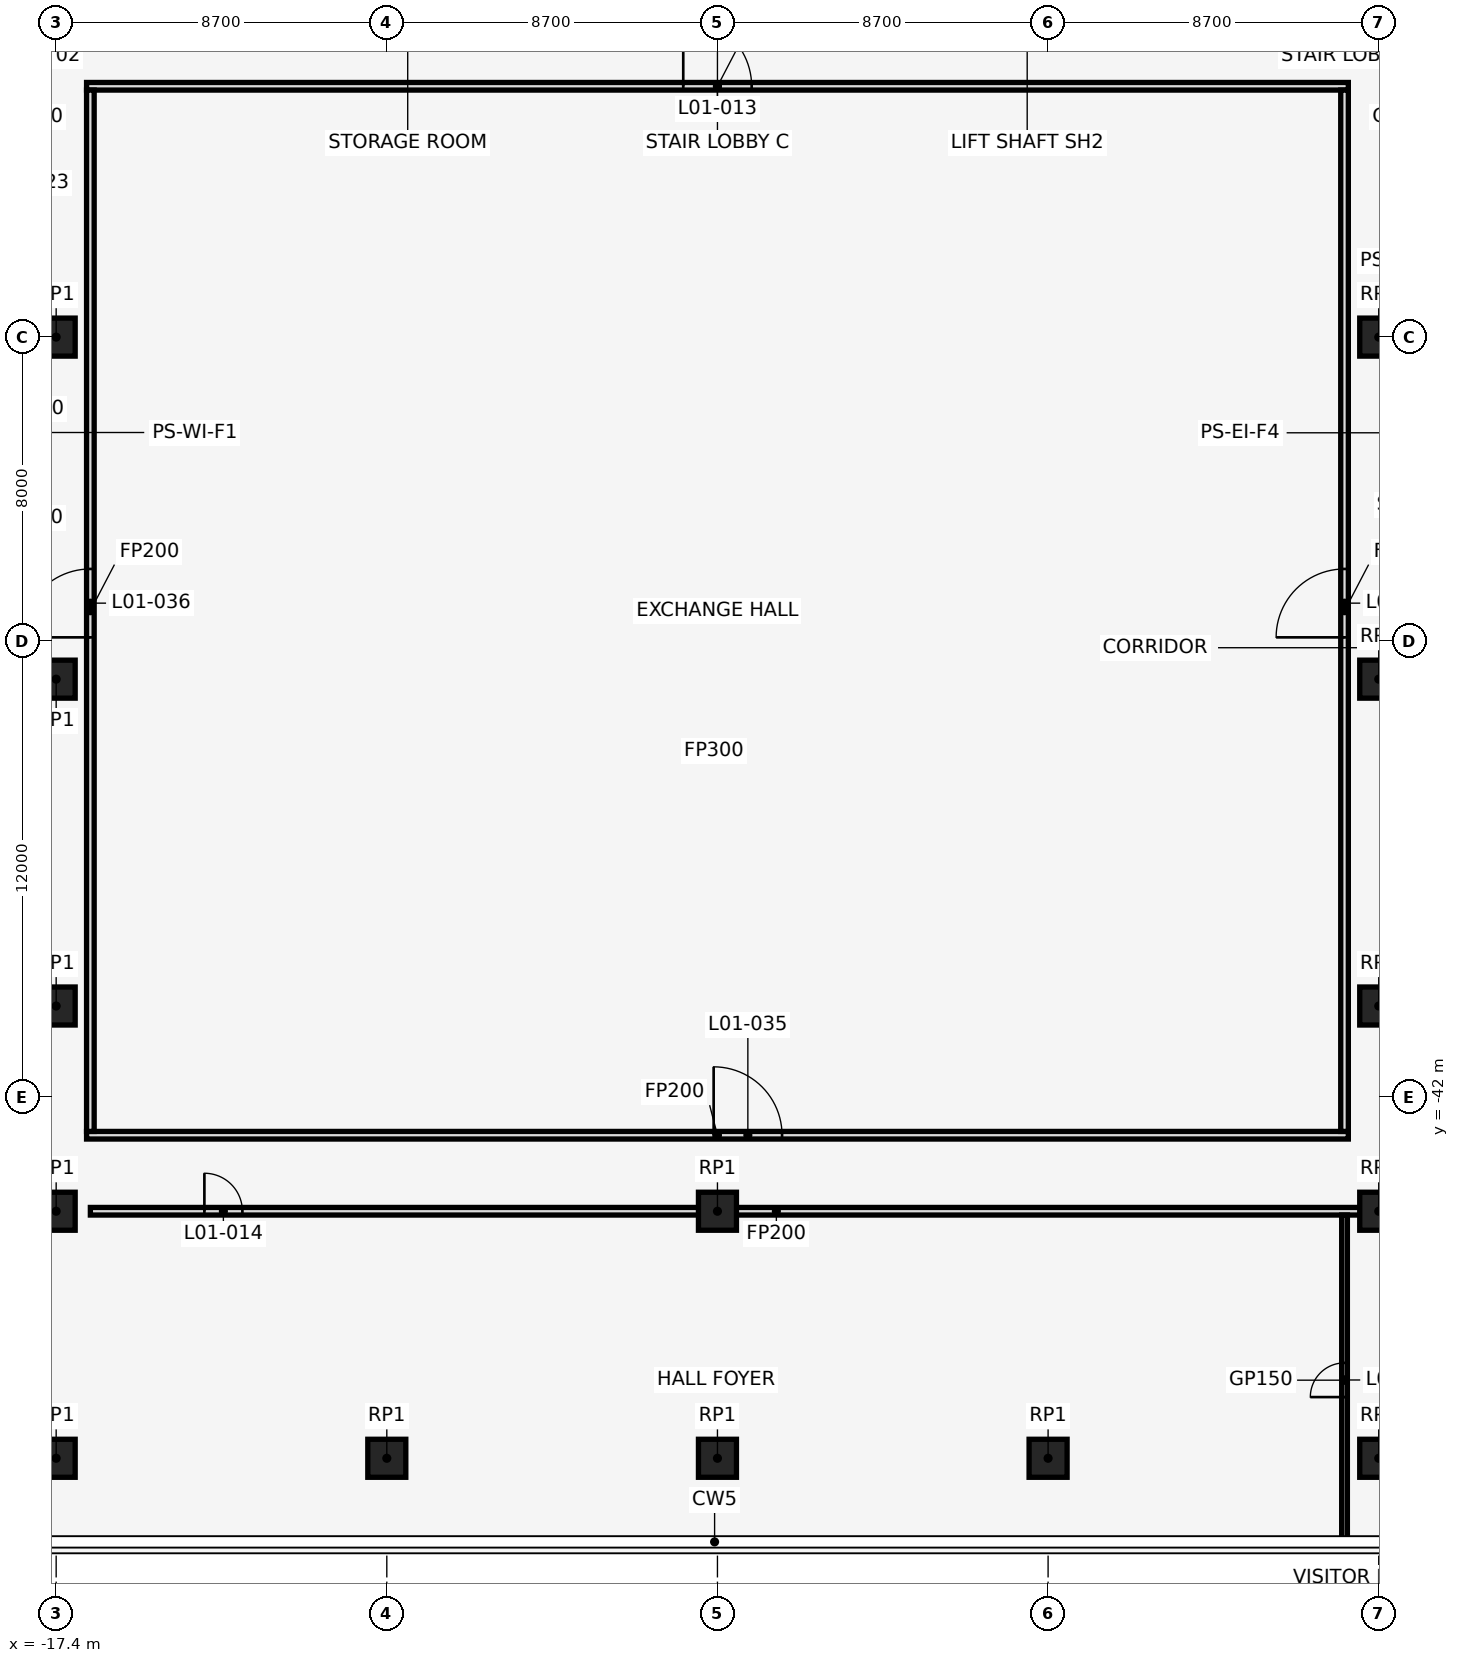
"""IFC4 building model, lengths in metres.
Left out: names, types, materials, properties, quantities, classifications, styles, units other than length and angle.
Written with IfcOpenShell. Run it as: python <this file> out.ifc"""

import sys

from ifc_helpers import new_model, si_unit, direction, frame, frame_2d, origin, origin_2d, place, context, subcontext, project, spatial, rectangle, extrude, element, fill, save


model = new_model("IFC4")
c1 = context("Model", 3, precision=1e-05, world=origin(), true_north=direction((0.0, 1.0)))
c2 = subcontext(c1, "Body", "Model", "MODEL_VIEW")
j1 = project(units=[si_unit("LENGTHUNIT", "METRE"), si_unit("PLANEANGLEUNIT", "RADIAN")], contexts=[c1])
p1 = place(None, origin())
s1 = spatial("IfcSite", under=j1, at=p1, CompositionType="ELEMENT")
p2 = place(p1, origin())
s2 = spatial("IfcBuilding", under=s1, at=p2, CompositionType="ELEMENT")
p3 = place(p2, frame((0.0, 0.0, 8.0)))
s3 = spatial("IfcBuildingStorey", under=s2, at=p3, CompositionType="ELEMENT", Elevation=8.0)
for number, where, z_axis, x_axis in (
    (1, (-17.4, -39.6, 0.0), (0.0, 0.0, 1.0), (1.0, 0.0, 0.0)),
    (2, (17.4, -39.6, 0.0), (0.0, 0.0, 1.0), (1.0, 0.0, 0.0)),
    (3, (-17.4, -22.0, 0.0), (0.0, 0.0, 1.0), (1.0, 0.0, 0.0)),
    (4, (17.4, -22.0, 0.0), (0.0, 0.0, 1.0), (1.0, 0.0, 0.0)),
    (5, (-17.4, -31.0, 0.0), (0.0, 0.0, 1.0), (1.0, 0.0, 0.0)),
    (6, (-17.4, -45.0, 0.0), (0.0, 0.0, 1.0), (1.0, 0.0, 0.0)),
    (7, (-17.4, -51.5, 0.0), (0.0, 0.0, 1.0), (1.0, 0.0, 0.0)),
    (8, (-8.7, -51.5, 0.0), (0.0, 0.0, 1.0), (1.0, 0.0, 0.0)),
    (9, (0.0, -45.0, 0.0), (0.0, 0.0, 1.0), (1.0, 0.0, 0.0)),
    (10, (0.0, -51.5, 0.0), (0.0, 0.0, 1.0), (1.0, 0.0, 0.0)),
    (11, (8.7, -51.5, 0.0), (0.0, 0.0, 1.0), (1.0, 0.0, 0.0)),
    (12, (17.4, -31.0, 0.0), (0.0, 0.0, 1.0), (1.0, 0.0, 0.0)),
    (13, (17.4, -45.0, 0.0), (0.0, 0.0, 1.0), (1.0, 0.0, 0.0)),
    (14, (17.4, -51.5, 0.0), (0.0, 0.0, 1.0), (1.0, 0.0, 0.0)),
):
    element("IfcColumn", number, at=place(p3, frame(where, z_axis=z_axis, x_axis=x_axis)), inside=s3, PredefinedType="COLUMN", context=c2, shape_type="SweptSolid", body=[
        extrude(rectangle(XDim=1.0, YDim=1.0, at=origin_2d()), origin(), (0.0, 0.0, 1.0), 6.0),
    ])
p4 = place(p3, frame((-16.5, -45.0, 0.0), z_axis=(0.0, 0.0, 1.0), x_axis=(1.0, 0.0, 0.0)))
e15 = element("IfcWall", 15, at=p4, inside=s3, PredefinedType="PARTITIONING", context=c2, shape_type="SweptSolid", body=[
    extrude(rectangle(XDim=36.1, YDim=0.2, at=frame_2d((18.05, 0.0))), origin(), (0.0, 0.0, 1.0), 5.7),
])
p5 = place(p4, frame((3.0, 0.0, 0.0)))
e16 = element("IfcOpeningElement", 16, at=p5, cuts=e15, PredefinedType="OPENING", context=c2, shape_type="SweptSolid", body=[
    extrude(rectangle(XDim=1.0, YDim=2.1, at=frame_2d((0.5, 1.05))), frame((0.0, 0.112, 0.0), z_axis=(0.0, -1.0, 0.0), x_axis=(1.0, 0.0, 0.0)), (0.0, 0.0, 1.0), 0.224),
])
p6 = place(p3, frame((-16.6, -43.0, 0.0), z_axis=(0.0, 0.0, 1.0), x_axis=(1.0, 0.0, 0.0)))
e17 = element("IfcWall", 17, at=p6, inside=s3, PredefinedType="PARTITIONING", context=c2, shape_type="SweptSolid", body=[
    extrude(rectangle(XDim=33.2, YDim=0.2, at=frame_2d((16.6, 0.0))), origin(), (0.0, 0.0, 1.0), 5.7),
])
p7 = place(p6, frame((16.5, 0.0, 0.0)))
e18 = element("IfcOpeningElement", 18, at=p7, cuts=e17, PredefinedType="OPENING", context=c2, shape_type="SweptSolid", body=[
    extrude(rectangle(XDim=1.8, YDim=2.1, at=frame_2d((0.9, 1.05))), frame((0.0, 0.112, 0.0), z_axis=(0.0, -1.0, 0.0), x_axis=(1.0, 0.0, 0.0)), (0.0, 0.0, 1.0), 0.224),
])
p8 = place(p3, frame((-16.6, -15.4, 0.0), z_axis=(0.0, 0.0, 1.0), x_axis=(1.0, 0.0, 0.0)))
e19 = element("IfcWall", 19, at=p8, inside=s3, PredefinedType="PARTITIONING", context=c2, shape_type="SweptSolid", body=[
    extrude(rectangle(XDim=33.2, YDim=0.2, at=frame_2d((16.6, 0.0))), origin(), (0.0, 0.0, 1.0), 5.7),
])
p9 = place(p8, frame((15.7, 0.0, 0.0)))
e20 = element("IfcOpeningElement", 20, at=p9, cuts=e19, PredefinedType="OPENING", context=c2, shape_type="SweptSolid", body=[
    extrude(rectangle(XDim=1.8, YDim=2.1, at=frame_2d((0.9, 1.05))), frame((0.0, 0.112, 0.0), z_axis=(0.0, -1.0, 0.0), x_axis=(1.0, 0.0, 0.0)), (0.0, 0.0, 1.0), 0.224),
])
p10 = place(p3, frame((-16.5, -42.9, 0.0), z_axis=(0.0, 0.0, 1.0), x_axis=(0.0, 1.0, 0.0)))
e21 = element("IfcWall", 21, at=p10, inside=s3, PredefinedType="PARTITIONING", context=c2, shape_type="SweptSolid", body=[
    extrude(rectangle(XDim=27.4, YDim=0.2, at=frame_2d((13.7, 0.0))), origin(), (0.0, 0.0, 1.0), 5.7),
])
p11 = place(p10, frame((13.0, 0.0, 0.0)))
e22 = element("IfcOpeningElement", 22, at=p11, cuts=e21, PredefinedType="OPENING", context=c2, shape_type="SweptSolid", body=[
    extrude(rectangle(XDim=1.8, YDim=2.1, at=frame_2d((0.9, 1.05))), frame((0.0, 0.112, 0.0), z_axis=(0.0, -1.0, 0.0), x_axis=(1.0, 0.0, 0.0)), (0.0, 0.0, 1.0), 0.224),
])
p12 = place(p3, frame((16.5, -53.79, 0.0), z_axis=(0.0, 0.0, 1.0), x_axis=(0.0, 1.0, 0.0)))
e23 = element("IfcWall", 23, at=p12, inside=s3, PredefinedType="PARTITIONING", context=c2, shape_type="SweptSolid", body=[
    extrude(rectangle(XDim=8.69, YDim=0.15, at=frame_2d((4.345, 0.0))), origin(), (0.0, 0.0, 1.0), 5.7),
])
p13 = place(p12, frame((3.9, 0.0, 0.0)))
e24 = element("IfcOpeningElement", 24, at=p13, cuts=e23, PredefinedType="OPENING", context=c2, shape_type="SweptSolid", body=[
    extrude(rectangle(XDim=0.9, YDim=2.1, at=frame_2d((0.45, 1.05))), frame((0.0, 0.087, 0.0), z_axis=(0.0, -1.0, 0.0), x_axis=(1.0, 0.0, 0.0)), (0.0, 0.0, 1.0), 0.174),
])
p14 = place(p3, frame((16.5, -42.9, 0.0), z_axis=(0.0, 0.0, 1.0), x_axis=(0.0, 1.0, 0.0)))
e25 = element("IfcWall", 25, at=p14, inside=s3, PredefinedType="PARTITIONING", context=c2, shape_type="SweptSolid", body=[
    extrude(rectangle(XDim=27.4, YDim=0.2, at=frame_2d((13.7, 0.0))), origin(), (0.0, 0.0, 1.0), 5.7),
])
p15 = place(p14, frame((13.0, 0.0, 0.0)))
e26 = element("IfcOpeningElement", 26, at=p15, cuts=e25, PredefinedType="OPENING", context=c2, shape_type="SweptSolid", body=[
    extrude(rectangle(XDim=1.8, YDim=2.1, at=frame_2d((0.9, 1.05))), frame((0.0, 0.112, 0.0), z_axis=(0.0, -1.0, 0.0), x_axis=(1.0, 0.0, 0.0)), (0.0, 0.0, 1.0), 0.224),
])
p16 = place(p9, origin())
e27 = element("IfcDoor", 27, at=p16, inside=s3, OperationType="SINGLE_SWING_LEFT", PredefinedType="DOOR", context=c2, shape_type="SweptSolid", body=[
    extrude(rectangle(XDim=1.8, YDim=2.1, at=frame_2d((0.9, 1.05))), frame((0.0, 0.025, 0.0), z_axis=(0.0, -1.0, 0.0), x_axis=(1.0, 0.0, 0.0)), (0.0, 0.0, 1.0), 0.05),
])
fill(e20, e27)
p17 = place(p5, frame((1.0, 0.0, 0.0), z_axis=(0.0, 0.0, 1.0), x_axis=(-1.0, 0.0, 0.0)))
e28 = element("IfcDoor", 28, at=p17, inside=s3, OperationType="SINGLE_SWING_RIGHT", PredefinedType="DOOR", context=c2, shape_type="SweptSolid", body=[
    extrude(rectangle(XDim=1.0, YDim=2.1, at=frame_2d((0.5, 1.05))), frame((0.0, 0.025, 0.0), z_axis=(0.0, -1.0, 0.0), x_axis=(1.0, 0.0, 0.0)), (0.0, 0.0, 1.0), 0.05),
])
fill(e16, e28)
p18 = place(p13, frame((0.9, 0.0, 0.0), z_axis=(0.0, 0.0, 1.0), x_axis=(-1.0, 0.0, 0.0)))
e29 = element("IfcDoor", 29, at=p18, inside=s3, OperationType="SINGLE_SWING_LEFT", PredefinedType="DOOR", context=c2, shape_type="SweptSolid", body=[
    extrude(rectangle(XDim=0.9, YDim=2.1, at=frame_2d((0.45, 1.05))), frame((0.0, 0.025, 0.0), z_axis=(0.0, -1.0, 0.0), x_axis=(1.0, 0.0, 0.0)), (0.0, 0.0, 1.0), 0.05),
])
fill(e24, e29)
p19 = place(p7, origin())
e30 = element("IfcDoor", 30, at=p19, inside=s3, OperationType="SINGLE_SWING_LEFT", PredefinedType="DOOR", context=c2, shape_type="SweptSolid", body=[
    extrude(rectangle(XDim=1.8, YDim=2.1, at=frame_2d((0.9, 1.05))), frame((0.0, 0.025, 0.0), z_axis=(0.0, -1.0, 0.0), x_axis=(1.0, 0.0, 0.0)), (0.0, 0.0, 1.0), 0.05),
])
fill(e18, e30)
p20 = place(p11, origin())
e31 = element("IfcDoor", 31, at=p20, inside=s3, OperationType="SINGLE_SWING_LEFT", PredefinedType="DOOR", context=c2, shape_type="SweptSolid", body=[
    extrude(rectangle(XDim=1.8, YDim=2.1, at=frame_2d((0.9, 1.05))), frame((0.0, 0.025, 0.0), z_axis=(0.0, -1.0, 0.0), x_axis=(1.0, 0.0, 0.0)), (0.0, 0.0, 1.0), 0.05),
])
fill(e22, e31)
p21 = place(p15, origin())
e32 = element("IfcDoor", 32, at=p21, inside=s3, OperationType="SINGLE_SWING_LEFT", PredefinedType="DOOR", context=c2, shape_type="SweptSolid", body=[
    extrude(rectangle(XDim=1.8, YDim=2.1, at=frame_2d((0.9, 1.05))), frame((0.0, 0.025, 0.0), z_axis=(0.0, -1.0, 0.0), x_axis=(1.0, 0.0, 0.0)), (0.0, 0.0, 1.0), 0.05),
])
fill(e26, e32)
save(model, sys.argv[1])
